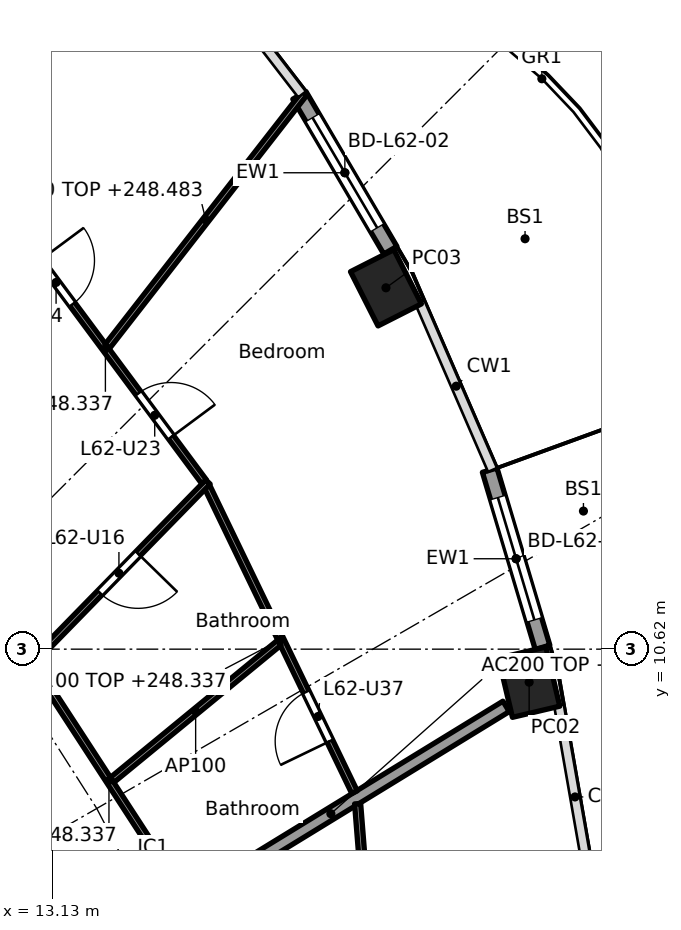
"""IFC4 building model, lengths in metres.
Left out: names, types, materials, properties, quantities, classifications, styles, units other than length and angle.
Written with IfcOpenShell. Run it as: python <this file> out.ifc"""

import sys

from ifc_helpers import new_model, si_unit, direction, frame, frame_2d, origin, origin_2d, place, context, subcontext, project, spatial, rectangle, hollow_rectangle, extrude, element, fill, save


model = new_model("IFC4")
c1 = context("Model", 3, precision=1e-05, world=origin(), true_north=direction((0.0, 1.0)))
c2 = subcontext(c1, "Body", "Model", "MODEL_VIEW")
j1 = project(units=[si_unit("LENGTHUNIT", "METRE"), si_unit("PLANEANGLEUNIT", "RADIAN")], contexts=[c1])
p1 = place(None, origin())
s1 = spatial("IfcSite", under=j1, at=p1, CompositionType="ELEMENT")
p2 = place(p1, origin())
s2 = spatial("IfcBuilding", under=s1, at=p2, CompositionType="ELEMENT")
p3 = place(p2, frame((0.0, 0.0, 245.5)))
s3 = spatial("IfcBuildingStorey", under=s2, at=p3, CompositionType="ELEMENT", Elevation=245.5)
for number, where, z_axis, x_axis in (
    (1, (20.967, 10.077, 0.0), (0.0, 0.0, 1.0), (-0.229, 0.973, 0.0)),
    (2, (18.612, 16.563, 0.0), (0.0, 0.0, 1.0), (-0.452, 0.892, 0.0)),
):
    element("IfcColumn", number, at=place(p3, frame(where, z_axis=z_axis, x_axis=x_axis)), inside=s3, PredefinedType="COLUMN", context=c2, shape_type="SweptSolid", body=[
        extrude(hollow_rectangle(XDim=1.0, YDim=0.8, WallThickness=0.032, at=origin_2d()), origin(), (0.0, 0.0, 1.0), 3.7),
    ])
p4 = place(p3, frame((20.318, 13.564, 0.0), z_axis=(0.0, 0.0, 1.0), x_axis=(0.285785716255, -0.958293548128, 0.0)))
e3 = element("IfcWall", 3, at=p4, inside=s3, PredefinedType="SOLIDWALL", context=c2, shape_type="SweptSolid", body=[
    extrude(rectangle(XDim=3.04, YDim=0.25, at=frame_2d((1.52, 0.0))), origin(), (0.0, 0.0, 1.0), 3.44),
])
p5 = place(p4, frame((0.47, 0.0, 0.0)))
e4 = element("IfcOpeningElement", 4, at=p5, cuts=e3, PredefinedType="OPENING", context=c2, shape_type="SweptSolid", body=[
    extrude(rectangle(XDim=2.1, YDim=2.4, at=frame_2d((1.05, 1.2))), frame((0.0, 0.135, 0.0), z_axis=(0.0, -1.0, 0.0), x_axis=(1.0, 0.0, 0.0)), (0.0, 0.0, 1.0), 0.27),
])
p6 = place(p3, frame((17.188, 19.728, 0.0), z_axis=(0.0, 0.0, 1.0), x_axis=(0.506391620556, -0.862303616269, 0.0)))
e5 = element("IfcWall", 5, at=p6, inside=s3, PredefinedType="SOLIDWALL", context=c2, shape_type="SweptSolid", body=[
    extrude(rectangle(XDim=2.954, YDim=0.25, at=frame_2d((1.477, 0.0))), origin(), (0.0, 0.0, 1.0), 3.44),
])
p7 = place(p6, frame((0.427, 0.0, 0.0)))
e6 = element("IfcOpeningElement", 6, at=p7, cuts=e5, PredefinedType="OPENING", context=c2, shape_type="SweptSolid", body=[
    extrude(rectangle(XDim=2.1, YDim=2.4, at=frame_2d((1.05, 1.2))), frame((0.0, 0.135, 0.0), z_axis=(0.0, -1.0, 0.0), x_axis=(1.0, 0.0, 0.0)), (0.0, 0.0, 1.0), 0.27),
])
p8 = place(p3, frame((14.825, 6.149, 0.0), z_axis=(0.0, 0.0, 1.0), x_axis=(0.852781365284, 0.522268075824, 0.0)))
e7 = element("IfcWall", 7, at=p8, inside=s3, PredefinedType="PARTITIONING", context=c2, shape_type="SweptSolid", body=[
    extrude(rectangle(XDim=6.758, YDim=0.2, at=frame_2d((3.379, 0.0))), origin(), (0.0, 0.0, 1.0), 2.837),
])
p9 = place(p3, frame((18.578, 2.642, 0.0), z_axis=(0.0, 0.0, 1.0), x_axis=(-0.079188322924, 0.996859673932, 0.0)))
e8 = element("IfcWall", 8, at=p9, inside=s3, PredefinedType="PARTITIONING", context=c2, shape_type="SweptSolid", body=[
    extrude(rectangle(XDim=5.454, YDim=0.1, at=frame_2d((2.727, 0.0))), origin(), (0.0, 0.0, 1.0), 2.837),
])
p10 = place(p9, frame((3.653, 0.0, 0.0)))
e9 = element("IfcOpeningElement", 9, at=p10, cuts=e8, PredefinedType="OPENING", context=c2, shape_type="SweptSolid", body=[
    extrude(rectangle(XDim=0.9, YDim=2.1, at=frame_2d((0.45, 1.05))), frame((0.0, 0.06, 0.0), z_axis=(0.0, -1.0, 0.0), x_axis=(1.0, 0.0, 0.0)), (0.0, 0.0, 1.0), 0.12),
])
p11 = place(p3, frame((15.295, 6.554, 0.0), z_axis=(0.0, 0.0, 1.0), x_axis=(-0.545150807833, 0.838337996705, 0.0)))
e10 = element("IfcWall", 10, at=p11, inside=s3, PredefinedType="PARTITIONING", context=c2, shape_type="SweptSolid", body=[
    extrude(rectangle(XDim=4.542, YDim=0.1, at=frame_2d((2.271, 0.0))), origin(), (0.0, 0.0, 1.0), 2.837),
])
p12 = place(p3, frame((18.095, 8.269, 0.0), z_axis=(0.0, 0.0, 1.0), x_axis=(-0.434643729881, 0.900602480607, 0.0)))
e11 = element("IfcWall", 11, at=p12, inside=s3, PredefinedType="PARTITIONING", context=c2, shape_type="SweptSolid", body=[
    extrude(rectangle(XDim=5.574, YDim=0.1, at=frame_2d((2.787, 0.0))), origin(), (0.0, 0.0, 1.0), 2.837),
])
p13 = place(p12, frame((0.931, 0.0, 0.0)))
e12 = element("IfcOpeningElement", 12, at=p13, cuts=e11, PredefinedType="OPENING", context=c2, shape_type="SweptSolid", body=[
    extrude(rectangle(XDim=0.9, YDim=2.1, at=frame_2d((0.45, 1.05))), frame((0.0, 0.06, 0.0), z_axis=(0.0, -1.0, 0.0), x_axis=(1.0, 0.0, 0.0)), (0.0, 0.0, 1.0), 0.12),
])
p14 = place(p3, frame((14.109, 8.469, 0.0), z_axis=(0.0, 0.0, 1.0), x_axis=(0.772802064515, 0.634647121699, 0.0)))
e13 = element("IfcWall", 13, at=p14, inside=s3, PredefinedType="PARTITIONING", context=c2, shape_type="SweptSolid", body=[
    extrude(rectangle(XDim=3.554, YDim=0.1, at=frame_2d((1.777, 0.0))), origin(), (0.0, 0.0, 1.0), 3.44),
])
p15 = place(p3, frame((10.181, 7.729, 0.0), z_axis=(0.0, 0.0, 1.0), x_axis=(0.698426432281, 0.715681855779, 0.0)))
e14 = element("IfcWall", 14, at=p15, inside=s3, PredefinedType="PARTITIONING", context=c2, shape_type="SweptSolid", body=[
    extrude(rectangle(XDim=7.881, YDim=0.1, at=frame_2d((3.94, 0.0))), origin(), (0.0, 0.0, 1.0), 2.762),
])
p16 = place(p15, frame((1.419, 0.0, 0.0)))
e15 = element("IfcOpeningElement", 15, at=p16, cuts=e14, PredefinedType="OPENING", context=c2, shape_type="SweptSolid", body=[
    extrude(rectangle(XDim=0.9, YDim=2.1, at=frame_2d((0.45, 1.05))), frame((0.0, 0.06, 0.0), z_axis=(0.0, -1.0, 0.0), x_axis=(1.0, 0.0, 0.0)), (0.0, 0.0, 1.0), 0.12),
])
p17 = place(p15, frame((5.334, 0.0, 0.0)))
e16 = element("IfcOpeningElement", 16, at=p17, cuts=e14, PredefinedType="OPENING", context=c2, shape_type="SweptSolid", body=[
    extrude(rectangle(XDim=0.9, YDim=2.1, at=frame_2d((0.45, 1.05))), frame((0.0, 0.06, 0.0), z_axis=(0.0, -1.0, 0.0), x_axis=(1.0, 0.0, 0.0)), (0.0, 0.0, 1.0), 0.12),
])
p18 = place(p3, frame((15.621, 13.374, 0.0), z_axis=(0.0, 0.0, 1.0), x_axis=(-0.596174489482, 0.8028548923, 0.0)))
e17 = element("IfcWall", 17, at=p18, inside=s3, PredefinedType="PARTITIONING", context=c2, shape_type="SweptSolid", body=[
    extrude(rectangle(XDim=5.442, YDim=0.1, at=frame_2d((2.721, 0.0))), origin(), (0.0, 0.0, 1.0), 2.837),
])
p19 = place(p18, frame((0.91, 0.0, 0.0)))
e18 = element("IfcOpeningElement", 18, at=p19, cuts=e17, PredefinedType="OPENING", context=c2, shape_type="SweptSolid", body=[
    extrude(rectangle(XDim=0.9, YDim=2.1, at=frame_2d((0.45, 1.05))), frame((0.0, 0.06, 0.0), z_axis=(0.0, -1.0, 0.0), x_axis=(1.0, 0.0, 0.0)), (0.0, 0.0, 1.0), 0.12),
])
p20 = place(p18, frame((3.631, 0.0, 0.0)))
e19 = element("IfcOpeningElement", 19, at=p20, cuts=e17, PredefinedType="OPENING", context=c2, shape_type="SweptSolid", body=[
    extrude(rectangle(XDim=0.9, YDim=2.1, at=frame_2d((0.45, 1.05))), frame((0.0, 0.06, 0.0), z_axis=(0.0, -1.0, 0.0), x_axis=(1.0, 0.0, 0.0)), (0.0, 0.0, 1.0), 0.12),
])
p21 = place(p3, frame((14.029, 15.598, 0.0), z_axis=(0.0, 0.0, 1.0), x_axis=(0.614558710688, 0.788871086501, 0.0)))
e20 = element("IfcWall", 20, at=p21, inside=s3, PredefinedType="PARTITIONING", context=c2, shape_type="SweptSolid", body=[
    extrude(rectangle(XDim=5.276, YDim=0.1, at=frame_2d((2.638, 0.0))), origin(), (0.0, 0.0, 1.0), 2.983),
])
p22 = place(p5, origin())
e21 = element("IfcDoor", 21, at=p22, inside=s3, OperationType="SLIDING_TO_LEFT", PredefinedType="DOOR", context=c2, shape_type="SweptSolid", body=[
    extrude(rectangle(XDim=2.1, YDim=2.4, at=frame_2d((1.05, 1.2))), frame((0.0, 0.025, 0.0), z_axis=(0.0, -1.0, 0.0), x_axis=(1.0, 0.0, 0.0)), (0.0, 0.0, 1.0), 0.05),
])
fill(e4, e21)
p23 = place(p7, origin())
e22 = element("IfcDoor", 22, at=p23, inside=s3, OperationType="SLIDING_TO_LEFT", PredefinedType="DOOR", context=c2, shape_type="SweptSolid", body=[
    extrude(rectangle(XDim=2.1, YDim=2.4, at=frame_2d((1.05, 1.2))), frame((0.0, 0.025, 0.0), z_axis=(0.0, -1.0, 0.0), x_axis=(1.0, 0.0, 0.0)), (0.0, 0.0, 1.0), 0.05),
])
fill(e6, e22)
p24 = place(p17, frame((0.9, 0.0, 0.0), x_axis=(-1.0, 0.0, 0.0)))
e23 = element("IfcDoor", 23, at=p24, inside=s3, OperationType="SINGLE_SWING_LEFT", PredefinedType="DOOR", context=c2, shape_type="SweptSolid", body=[
    extrude(rectangle(XDim=0.9, YDim=2.1, at=frame_2d((0.45, 1.05))), frame((0.0, 0.025, 0.0), z_axis=(0.0, -1.0, 0.0), x_axis=(1.0, 0.0, 0.0)), (0.0, 0.0, 1.0), 0.05),
])
fill(e16, e23)
p25 = place(p19, frame((0.9, 0.0, 0.0), x_axis=(-1.0, 0.0, 0.0)))
e24 = element("IfcDoor", 24, at=p25, inside=s3, OperationType="SINGLE_SWING_RIGHT", PredefinedType="DOOR", context=c2, shape_type="SweptSolid", body=[
    extrude(rectangle(XDim=0.9, YDim=2.1, at=frame_2d((0.45, 1.05))), frame((0.0, 0.025, 0.0), z_axis=(0.0, -1.0, 0.0), x_axis=(1.0, 0.0, 0.0)), (0.0, 0.0, 1.0), 0.05),
])
fill(e18, e24)
p26 = place(p20, frame((0.9, 0.0, 0.0), x_axis=(-1.0, 0.0, 0.0)))
e25 = element("IfcDoor", 25, at=p26, inside=s3, OperationType="SINGLE_SWING_LEFT", PredefinedType="DOOR", context=c2, shape_type="SweptSolid", body=[
    extrude(rectangle(XDim=0.9, YDim=2.1, at=frame_2d((0.45, 1.05))), frame((0.0, 0.025, 0.0), z_axis=(0.0, -1.0, 0.0), x_axis=(1.0, 0.0, 0.0)), (0.0, 0.0, 1.0), 0.05),
])
fill(e19, e25)
p27 = place(p13, origin())
e26 = element("IfcDoor", 26, at=p27, inside=s3, OperationType="SINGLE_SWING_LEFT", PredefinedType="DOOR", context=c2, shape_type="SweptSolid", body=[
    extrude(rectangle(XDim=0.9, YDim=2.1, at=frame_2d((0.45, 1.05))), frame((0.0, 0.025, 0.0), z_axis=(0.0, -1.0, 0.0), x_axis=(1.0, 0.0, 0.0)), (0.0, 0.0, 1.0), 0.05),
])
fill(e12, e26)
save(model, sys.argv[1])
